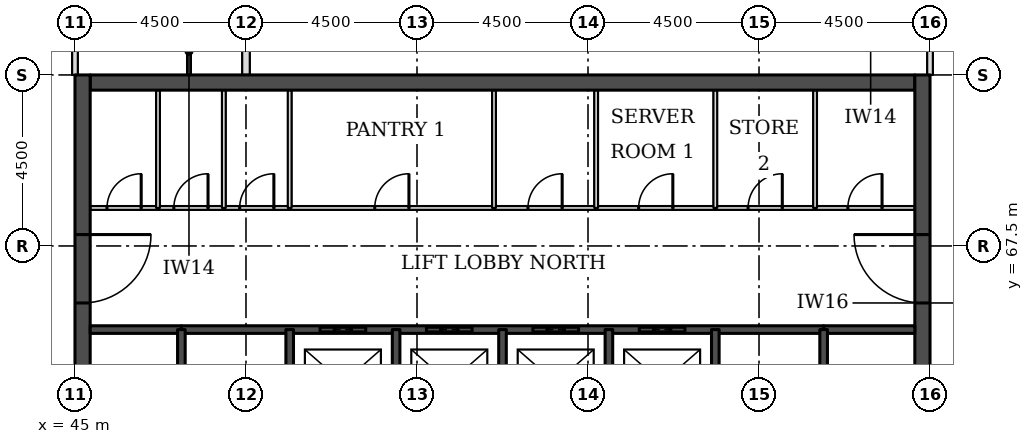
"""IFC4 building model, lengths in metres.
Left out: names, types, materials, properties, quantities, classifications, styles, units other than length and angle.
Written with IfcOpenShell. Run it as: python <this file> out.ifc"""

import sys

from ifc_helpers import new_model, si_unit, direction, frame, frame_2d, origin, place, context, subcontext, project, spatial, rectangle, extrude, element, fill, save


model = new_model("IFC4")
c1 = context("Model", 3, precision=1e-05, world=origin(), true_north=direction((0.0, 1.0)))
c2 = subcontext(c1, "Body", "Model", "MODEL_VIEW")
j1 = project(units=[si_unit("LENGTHUNIT", "METRE"), si_unit("PLANEANGLEUNIT", "RADIAN")], contexts=[c1])
p1 = place(None, origin())
s1 = spatial("IfcSite", under=j1, at=p1, CompositionType="ELEMENT")
p2 = place(p1, origin())
s2 = spatial("IfcBuilding", under=s1, at=p2, CompositionType="ELEMENT")
p3 = place(p2, frame((0.0, 0.0, 184.7)))
s3 = spatial("IfcBuildingStorey", under=s2, at=p3, CompositionType="ELEMENT", Elevation=184.7)
p4 = place(p3, frame((45.4, 71.8, 0.0), z_axis=(0.0, 0.0, 1.0), x_axis=(1.0, 0.0, 0.0)))
e1 = element("IfcWall", 1, at=p4, inside=s3, PredefinedType="SHEAR", context=c2, shape_type="SweptSolid", body=[
    extrude(rectangle(XDim=21.7, YDim=0.4, at=frame_2d((10.85, 0.0))), origin(), (0.0, 0.0, 1.0), 3.7),
])
p5 = place(p3, frame((45.2, 49.5, 0.0), z_axis=(0.0, 0.0, 1.0), x_axis=(0.0, 1.0, 0.0)))
e2 = element("IfcWall", 2, at=p5, inside=s3, PredefinedType="SHEAR", context=c2, shape_type="SweptSolid", body=[
    extrude(rectangle(XDim=22.5, YDim=0.4, at=frame_2d((11.25, 0.0))), origin(), (0.0, 0.0, 1.0), 3.7),
])
p6 = place(p5, frame((4.2, 0.0, 0.0)))
e3 = element("IfcOpeningElement", 3, at=p6, cuts=e2, PredefinedType="OPENING", context=c2, shape_type="SweptSolid", body=[
    extrude(rectangle(XDim=1.8, YDim=2.1, at=frame_2d((0.9, 1.05))), frame((0.0, 0.21, 0.0), z_axis=(0.0, -1.0, 0.0), x_axis=(1.0, 0.0, 0.0)), (0.0, 0.0, 1.0), 0.42),
])
p7 = place(p5, frame((6.9, 0.0, 0.0)))
e4 = element("IfcOpeningElement", 4, at=p7, cuts=e2, PredefinedType="OPENING", context=c2, shape_type="SweptSolid", body=[
    extrude(rectangle(XDim=1.1, YDim=2.1, at=frame_2d((0.55, 1.05))), frame((0.0, 0.21, 0.0), z_axis=(0.0, -1.0, 0.0), x_axis=(1.0, 0.0, 0.0)), (0.0, 0.0, 1.0), 0.42),
])
p8 = place(p5, frame((13.6, 0.0, 0.0)))
e5 = element("IfcOpeningElement", 5, at=p8, cuts=e2, PredefinedType="OPENING", context=c2, shape_type="SweptSolid", body=[
    extrude(rectangle(XDim=1.1, YDim=2.1, at=frame_2d((0.55, 1.05))), frame((0.0, 0.21, 0.0), z_axis=(0.0, -1.0, 0.0), x_axis=(1.0, 0.0, 0.0)), (0.0, 0.0, 1.0), 0.42),
])
p9 = place(p5, frame((16.5, 0.0, 0.0)))
e6 = element("IfcOpeningElement", 6, at=p9, cuts=e2, PredefinedType="OPENING", context=c2, shape_type="SweptSolid", body=[
    extrude(rectangle(XDim=1.8, YDim=2.1, at=frame_2d((0.9, 1.05))), frame((0.0, 0.21, 0.0), z_axis=(0.0, -1.0, 0.0), x_axis=(1.0, 0.0, 0.0)), (0.0, 0.0, 1.0), 0.42),
])
p10 = place(p3, frame((67.3, 49.5, 0.0), z_axis=(0.0, 0.0, 1.0), x_axis=(0.0, 1.0, 0.0)))
e7 = element("IfcWall", 7, at=p10, inside=s3, PredefinedType="SHEAR", context=c2, shape_type="SweptSolid", body=[
    extrude(rectangle(XDim=22.5, YDim=0.4, at=frame_2d((11.25, 0.0))), origin(), (0.0, 0.0, 1.0), 3.7),
])
p11 = place(p10, frame((4.2, 0.0, 0.0)))
e8 = element("IfcOpeningElement", 8, at=p11, cuts=e7, PredefinedType="OPENING", context=c2, shape_type="SweptSolid", body=[
    extrude(rectangle(XDim=1.8, YDim=2.1, at=frame_2d((0.9, 1.05))), frame((0.0, 0.21, 0.0), z_axis=(0.0, -1.0, 0.0), x_axis=(1.0, 0.0, 0.0)), (0.0, 0.0, 1.0), 0.42),
])
p12 = place(p10, frame((6.9, 0.0, 0.0)))
e9 = element("IfcOpeningElement", 9, at=p12, cuts=e7, PredefinedType="OPENING", context=c2, shape_type="SweptSolid", body=[
    extrude(rectangle(XDim=1.1, YDim=2.1, at=frame_2d((0.55, 1.05))), frame((0.0, 0.21, 0.0), z_axis=(0.0, -1.0, 0.0), x_axis=(1.0, 0.0, 0.0)), (0.0, 0.0, 1.0), 0.42),
])
p13 = place(p10, frame((13.6, 0.0, 0.0)))
e10 = element("IfcOpeningElement", 10, at=p13, cuts=e7, PredefinedType="OPENING", context=c2, shape_type="SweptSolid", body=[
    extrude(rectangle(XDim=1.1, YDim=2.1, at=frame_2d((0.55, 1.05))), frame((0.0, 0.21, 0.0), z_axis=(0.0, -1.0, 0.0), x_axis=(1.0, 0.0, 0.0)), (0.0, 0.0, 1.0), 0.42),
])
p14 = place(p10, frame((16.5, 0.0, 0.0)))
e11 = element("IfcOpeningElement", 11, at=p14, cuts=e7, PredefinedType="OPENING", context=c2, shape_type="SweptSolid", body=[
    extrude(rectangle(XDim=1.8, YDim=2.1, at=frame_2d((0.9, 1.05))), frame((0.0, 0.21, 0.0), z_axis=(0.0, -1.0, 0.0), x_axis=(1.0, 0.0, 0.0)), (0.0, 0.0, 1.0), 0.42),
])
p15 = place(p3, frame((45.0, 72.0, 0.0), z_axis=(0.0, 0.0, 1.0), x_axis=(0.0, 1.0, 0.0)))
e12 = element("IfcWall", 12, at=p15, inside=s3, PredefinedType="PARTITIONING", context=c2, shape_type="SweptSolid", body=[
    extrude(rectangle(XDim=4.5, YDim=0.15, at=frame_2d((2.25, 0.0))), origin(), (0.0, 0.0, 1.0), 3.022),
])
p16 = place(p15, frame((1.75, 0.0, 0.0)))
e13 = element("IfcOpeningElement", 13, at=p16, cuts=e12, PredefinedType="OPENING", context=c2, shape_type="SweptSolid", body=[
    extrude(rectangle(XDim=1.0, YDim=2.1, at=frame_2d((0.5, 1.05))), frame((0.0, 0.085, 0.0), z_axis=(0.0, -1.0, 0.0), x_axis=(1.0, 0.0, 0.0)), (0.0, 0.0, 1.0), 0.17),
])
p17 = place(p3, frame((48.0, 72.0, 0.0), z_axis=(0.0, 0.0, 1.0), x_axis=(0.0, 1.0, 0.0)))
e14 = element("IfcWall", 14, at=p17, inside=s3, PredefinedType="PARTITIONING", context=c2, shape_type="SweptSolid", body=[
    extrude(rectangle(XDim=4.45, YDim=0.1, at=frame_2d((2.225, 0.0))), origin(), (0.0, 0.0, 1.0), 3.55),
])
p18 = place(p3, frame((49.5, 72.0, 0.0), z_axis=(0.0, 0.0, 1.0), x_axis=(0.0, 1.0, 0.0)))
e15 = element("IfcWall", 15, at=p18, inside=s3, PredefinedType="PARTITIONING", context=c2, shape_type="SweptSolid", body=[
    extrude(rectangle(XDim=3.0, YDim=0.2, at=frame_2d((1.5, 0.0))), origin(), (0.0, 0.0, 1.0), 3.55),
])
p19 = place(p3, frame((67.5, 72.0, 0.0), z_axis=(0.0, 0.0, 1.0), x_axis=(0.0, 1.0, 0.0)))
e16 = element("IfcWall", 16, at=p19, inside=s3, PredefinedType="PARTITIONING", context=c2, shape_type="SweptSolid", body=[
    extrude(rectangle(XDim=3.0, YDim=0.15, at=frame_2d((1.5, 0.0))), origin(), (0.0, 0.0, 1.0), 3.022),
])
for number, where, z_axis, x_axis in (
    (17, (45.4, 65.3, 0.0), (0.0, 0.0, 1.0), (1.0, 0.0, 0.0)),
    (18, (64.7, 65.3, 0.0), (0.0, 0.0, 1.0), (1.0, 0.0, 0.0)),
):
    element("IfcWall", number, at=place(p3, frame(where, z_axis=z_axis, x_axis=x_axis)), inside=s3, PredefinedType="SOLIDWALL", context=c2, shape_type="SweptSolid", body=[
        extrude(rectangle(XDim=2.4, YDim=0.2, at=frame_2d((1.2, 0.0))), origin(), (0.0, 0.0, 1.0), 3.55),
    ])
p20 = place(p3, frame((47.8, 65.3, 0.0), z_axis=(0.0, 0.0, 1.0), x_axis=(1.0, 0.0, 0.0)))
e19 = element("IfcWall", 19, at=p20, inside=s3, PredefinedType="SOLIDWALL", context=c2, shape_type="SweptSolid", body=[
    extrude(rectangle(XDim=16.9, YDim=0.2, at=frame_2d((8.45, 0.0))), origin(), (0.0, 0.0, 1.0), 3.55),
])
p21 = place(p20, frame((3.65, 0.0, 0.0)))
e20 = element("IfcOpeningElement", 20, at=p21, cuts=e19, PredefinedType="OPENING", context=c2, shape_type="SweptSolid", body=[
    extrude(rectangle(XDim=1.2, YDim=2.1, at=frame_2d((0.6, 1.05))), frame((0.0, 0.11, 0.0), z_axis=(0.0, -1.0, 0.0), x_axis=(1.0, 0.0, 0.0)), (0.0, 0.0, 1.0), 0.22),
])
p22 = place(p20, frame((6.45, 0.0, 0.0)))
e21 = element("IfcOpeningElement", 21, at=p22, cuts=e19, PredefinedType="OPENING", context=c2, shape_type="SweptSolid", body=[
    extrude(rectangle(XDim=1.2, YDim=2.1, at=frame_2d((0.6, 1.05))), frame((0.0, 0.11, 0.0), z_axis=(0.0, -1.0, 0.0), x_axis=(1.0, 0.0, 0.0)), (0.0, 0.0, 1.0), 0.22),
])
p23 = place(p20, frame((9.25, 0.0, 0.0)))
e22 = element("IfcOpeningElement", 22, at=p23, cuts=e19, PredefinedType="OPENING", context=c2, shape_type="SweptSolid", body=[
    extrude(rectangle(XDim=1.2, YDim=2.1, at=frame_2d((0.6, 1.05))), frame((0.0, 0.11, 0.0), z_axis=(0.0, -1.0, 0.0), x_axis=(1.0, 0.0, 0.0)), (0.0, 0.0, 1.0), 0.22),
])
p24 = place(p20, frame((12.05, 0.0, 0.0)))
e23 = element("IfcOpeningElement", 23, at=p24, cuts=e19, PredefinedType="OPENING", context=c2, shape_type="SweptSolid", body=[
    extrude(rectangle(XDim=1.2, YDim=2.1, at=frame_2d((0.6, 1.05))), frame((0.0, 0.11, 0.0), z_axis=(0.0, -1.0, 0.0), x_axis=(1.0, 0.0, 0.0)), (0.0, 0.0, 1.0), 0.22),
])
p25 = place(p3, frame((45.4, 68.5, 0.0), z_axis=(0.0, 0.0, 1.0), x_axis=(1.0, 0.0, 0.0)))
e24 = element("IfcWall", 24, at=p25, inside=s3, PredefinedType="PARTITIONING", context=c2, shape_type="SweptSolid", body=[
    extrude(rectangle(XDim=21.7, YDim=0.1, at=frame_2d((10.85, 0.0))), origin(), (0.0, 0.0, 1.0), 3.55),
])
p26 = place(p25, frame((19.938, 0.0, 0.0)))
e25 = element("IfcOpeningElement", 25, at=p26, cuts=e24, PredefinedType="OPENING", context=c2, shape_type="SweptSolid", body=[
    extrude(rectangle(XDim=0.9, YDim=2.1, at=frame_2d((0.45, 1.05))), frame((0.0, 0.06, 0.0), z_axis=(0.0, -1.0, 0.0), x_axis=(1.0, 0.0, 0.0)), (0.0, 0.0, 1.0), 0.12),
])
p27 = place(p25, frame((17.312, 0.0, 0.0)))
e26 = element("IfcOpeningElement", 26, at=p27, cuts=e24, PredefinedType="OPENING", context=c2, shape_type="SweptSolid", body=[
    extrude(rectangle(XDim=0.9, YDim=2.1, at=frame_2d((0.45, 1.05))), frame((0.0, 0.06, 0.0), z_axis=(0.0, -1.0, 0.0), x_axis=(1.0, 0.0, 0.0)), (0.0, 0.0, 1.0), 0.12),
])
p28 = place(p25, frame((0.442, 0.0, 0.0)))
e27 = element("IfcOpeningElement", 27, at=p28, cuts=e24, PredefinedType="OPENING", context=c2, shape_type="SweptSolid", body=[
    extrude(rectangle(XDim=0.9, YDim=2.1, at=frame_2d((0.45, 1.05))), frame((0.0, 0.06, 0.0), z_axis=(0.0, -1.0, 0.0), x_axis=(1.0, 0.0, 0.0)), (0.0, 0.0, 1.0), 0.12),
])
p29 = place(p25, frame((2.201, 0.0, 0.0)))
e28 = element("IfcOpeningElement", 28, at=p29, cuts=e24, PredefinedType="OPENING", context=c2, shape_type="SweptSolid", body=[
    extrude(rectangle(XDim=0.9, YDim=2.1, at=frame_2d((0.45, 1.05))), frame((0.0, 0.06, 0.0), z_axis=(0.0, -1.0, 0.0), x_axis=(1.0, 0.0, 0.0)), (0.0, 0.0, 1.0), 0.12),
])
p30 = place(p25, frame((3.934, 0.0, 0.0)))
e29 = element("IfcOpeningElement", 29, at=p30, cuts=e24, PredefinedType="OPENING", context=c2, shape_type="SweptSolid", body=[
    extrude(rectangle(XDim=0.9, YDim=2.1, at=frame_2d((0.45, 1.05))), frame((0.0, 0.06, 0.0), z_axis=(0.0, -1.0, 0.0), x_axis=(1.0, 0.0, 0.0)), (0.0, 0.0, 1.0), 0.12),
])
p31 = place(p25, frame((14.432, 0.0, 0.0)))
e30 = element("IfcOpeningElement", 30, at=p31, cuts=e24, PredefinedType="OPENING", context=c2, shape_type="SweptSolid", body=[
    extrude(rectangle(XDim=0.9, YDim=2.1, at=frame_2d((0.45, 1.05))), frame((0.0, 0.06, 0.0), z_axis=(0.0, -1.0, 0.0), x_axis=(1.0, 0.0, 0.0)), (0.0, 0.0, 1.0), 0.12),
])
p32 = place(p25, frame((11.52, 0.0, 0.0)))
e31 = element("IfcOpeningElement", 31, at=p32, cuts=e24, PredefinedType="OPENING", context=c2, shape_type="SweptSolid", body=[
    extrude(rectangle(XDim=0.9, YDim=2.1, at=frame_2d((0.45, 1.05))), frame((0.0, 0.06, 0.0), z_axis=(0.0, -1.0, 0.0), x_axis=(1.0, 0.0, 0.0)), (0.0, 0.0, 1.0), 0.12),
])
p33 = place(p25, frame((7.488, 0.0, 0.0)))
e32 = element("IfcOpeningElement", 32, at=p33, cuts=e24, PredefinedType="OPENING", context=c2, shape_type="SweptSolid", body=[
    extrude(rectangle(XDim=0.9, YDim=2.1, at=frame_2d((0.45, 1.05))), frame((0.0, 0.06, 0.0), z_axis=(0.0, -1.0, 0.0), x_axis=(1.0, 0.0, 0.0)), (0.0, 0.0, 1.0), 0.12),
])
p34 = place(p3, frame((47.185, 68.5, 0.0), z_axis=(0.0, 0.0, 1.0), x_axis=(0.0, 1.0, 0.0)))
e33 = element("IfcWall", 33, at=p34, inside=s3, PredefinedType="PARTITIONING", context=c2, shape_type="SweptSolid", body=[
    extrude(rectangle(XDim=3.1, YDim=0.1, at=frame_2d((1.55, 0.0))), origin(), (0.0, 0.0, 1.0), 3.55),
])
p35 = place(p3, frame((47.8, 62.0, 0.0), z_axis=(0.0, 0.0, 1.0), x_axis=(0.0, 1.0, 0.0)))
e34 = element("IfcWall", 34, at=p35, inside=s3, PredefinedType="SOLIDWALL", context=c2, shape_type="SweptSolid", body=[
    extrude(rectangle(XDim=3.3, YDim=0.2, at=frame_2d((1.65, 0.0))), origin(), (0.0, 0.0, 1.0), 3.55),
])
p36 = place(p35, frame((1.1, 0.0, 0.0)))
e35 = element("IfcOpeningElement", 35, at=p36, cuts=e34, PredefinedType="OPENING", context=c2, shape_type="SweptSolid", body=[
    extrude(rectangle(XDim=1.1, YDim=2.1, at=frame_2d((0.55, 1.05))), frame((0.0, 0.11, 0.0), z_axis=(0.0, -1.0, 0.0), x_axis=(1.0, 0.0, 0.0)), (0.0, 0.0, 1.0), 0.22),
])
for number, where, z_axis, x_axis in (
    (36, (48.917, 68.5, 0.0), (0.0, 0.0, 1.0), (0.0, 1.0, 0.0)),
    (37, (50.65, 68.5, 0.0), (0.0, 0.0, 1.0), (0.0, 1.0, 0.0)),
):
    element("IfcWall", number, at=place(p3, frame(where, z_axis=z_axis, x_axis=x_axis)), inside=s3, PredefinedType="PARTITIONING", context=c2, shape_type="SweptSolid", body=[
        extrude(rectangle(XDim=3.1, YDim=0.1, at=frame_2d((1.55, 0.0))), origin(), (0.0, 0.0, 1.0), 3.55),
    ])
p37 = place(p3, frame((50.65, 62.0, 0.0), z_axis=(0.0, 0.0, 1.0), x_axis=(0.0, 1.0, 0.0)))
e38 = element("IfcWall", 38, at=p37, inside=s3, PredefinedType="SOLIDWALL", context=c2, shape_type="SweptSolid", body=[
    extrude(rectangle(XDim=3.3, YDim=0.2, at=frame_2d((1.65, 0.0))), origin(), (0.0, 0.0, 1.0), 3.55),
])
p38 = place(p3, frame((53.45, 62.5, 0.0), z_axis=(0.0, 0.0, 1.0), x_axis=(0.0, 1.0, 0.0)))
e39 = element("IfcWall", 39, at=p38, inside=s3, PredefinedType="SOLIDWALL", context=c2, shape_type="SweptSolid", body=[
    extrude(rectangle(XDim=2.8, YDim=0.2, at=frame_2d((1.4, 0.0))), origin(), (0.0, 0.0, 1.0), 3.55),
])
p39 = place(p3, frame((56.026, 68.5, 0.0), z_axis=(0.0, 0.0, 1.0), x_axis=(0.0, 1.0, 0.0)))
e40 = element("IfcWall", 40, at=p39, inside=s3, PredefinedType="PARTITIONING", context=c2, shape_type="SweptSolid", body=[
    extrude(rectangle(XDim=3.1, YDim=0.1, at=frame_2d((1.55, 0.0))), origin(), (0.0, 0.0, 1.0), 3.55),
])
p40 = place(p3, frame((56.25, 62.5, 0.0), z_axis=(0.0, 0.0, 1.0), x_axis=(0.0, 1.0, 0.0)))
e41 = element("IfcWall", 41, at=p40, inside=s3, PredefinedType="SOLIDWALL", context=c2, shape_type="SweptSolid", body=[
    extrude(rectangle(XDim=2.8, YDim=0.2, at=frame_2d((1.4, 0.0))), origin(), (0.0, 0.0, 1.0), 3.55),
])
p41 = place(p3, frame((58.714, 68.5, 0.0), z_axis=(0.0, 0.0, 1.0), x_axis=(0.0, 1.0, 0.0)))
e42 = element("IfcWall", 42, at=p41, inside=s3, PredefinedType="PARTITIONING", context=c2, shape_type="SweptSolid", body=[
    extrude(rectangle(XDim=3.1, YDim=0.1, at=frame_2d((1.55, 0.0))), origin(), (0.0, 0.0, 1.0), 3.55),
])
p42 = place(p3, frame((59.05, 62.5, 0.0), z_axis=(0.0, 0.0, 1.0), x_axis=(0.0, 1.0, 0.0)))
e43 = element("IfcWall", 43, at=p42, inside=s3, PredefinedType="SOLIDWALL", context=c2, shape_type="SweptSolid", body=[
    extrude(rectangle(XDim=2.8, YDim=0.2, at=frame_2d((1.4, 0.0))), origin(), (0.0, 0.0, 1.0), 3.55),
])
p43 = place(p3, frame((61.85, 68.5, 0.0), z_axis=(0.0, 0.0, 1.0), x_axis=(0.0, 1.0, 0.0)))
e44 = element("IfcWall", 44, at=p43, inside=s3, PredefinedType="PARTITIONING", context=c2, shape_type="SweptSolid", body=[
    extrude(rectangle(XDim=3.1, YDim=0.1, at=frame_2d((1.55, 0.0))), origin(), (0.0, 0.0, 1.0), 3.55),
])
p44 = place(p3, frame((61.85, 62.0, 0.0), z_axis=(0.0, 0.0, 1.0), x_axis=(0.0, 1.0, 0.0)))
e45 = element("IfcWall", 45, at=p44, inside=s3, PredefinedType="SOLIDWALL", context=c2, shape_type="SweptSolid", body=[
    extrude(rectangle(XDim=3.3, YDim=0.2, at=frame_2d((1.65, 0.0))), origin(), (0.0, 0.0, 1.0), 3.55),
])
p45 = place(p3, frame((64.475, 68.5, 0.0), z_axis=(0.0, 0.0, 1.0), x_axis=(0.0, 1.0, 0.0)))
e46 = element("IfcWall", 46, at=p45, inside=s3, PredefinedType="PARTITIONING", context=c2, shape_type="SweptSolid", body=[
    extrude(rectangle(XDim=3.1, YDim=0.1, at=frame_2d((1.55, 0.0))), origin(), (0.0, 0.0, 1.0), 3.55),
])
p46 = place(p3, frame((64.7, 62.0, 0.0), z_axis=(0.0, 0.0, 1.0), x_axis=(0.0, 1.0, 0.0)))
e47 = element("IfcWall", 47, at=p46, inside=s3, PredefinedType="SOLIDWALL", context=c2, shape_type="SweptSolid", body=[
    extrude(rectangle(XDim=3.3, YDim=0.2, at=frame_2d((1.65, 0.0))), origin(), (0.0, 0.0, 1.0), 3.55),
])
p47 = place(p46, frame((1.1, 0.0, 0.0)))
e48 = element("IfcOpeningElement", 48, at=p47, cuts=e47, PredefinedType="OPENING", context=c2, shape_type="SweptSolid", body=[
    extrude(rectangle(XDim=1.1, YDim=2.1, at=frame_2d((0.55, 1.05))), frame((0.0, 0.11, 0.0), z_axis=(0.0, -1.0, 0.0), x_axis=(1.0, 0.0, 0.0)), (0.0, 0.0, 1.0), 0.22),
])
p48 = place(p21, origin())
e49 = element("IfcDoor", 49, at=p48, inside=s3, OperationType="DOUBLE_DOOR_SLIDING", PredefinedType="DOOR", context=c2, shape_type="SweptSolid", body=[
    extrude(rectangle(XDim=1.2, YDim=2.1, at=frame_2d((0.6, 1.05))), frame((0.0, 0.025, 0.0), z_axis=(0.0, -1.0, 0.0), x_axis=(1.0, 0.0, 0.0)), (0.0, 0.0, 1.0), 0.05),
])
fill(e20, e49)
p49 = place(p22, origin())
e50 = element("IfcDoor", 50, at=p49, inside=s3, OperationType="DOUBLE_DOOR_SLIDING", PredefinedType="DOOR", context=c2, shape_type="SweptSolid", body=[
    extrude(rectangle(XDim=1.2, YDim=2.1, at=frame_2d((0.6, 1.05))), frame((0.0, 0.025, 0.0), z_axis=(0.0, -1.0, 0.0), x_axis=(1.0, 0.0, 0.0)), (0.0, 0.0, 1.0), 0.05),
])
fill(e21, e50)
p50 = place(p23, origin())
e51 = element("IfcDoor", 51, at=p50, inside=s3, OperationType="DOUBLE_DOOR_SLIDING", PredefinedType="DOOR", context=c2, shape_type="SweptSolid", body=[
    extrude(rectangle(XDim=1.2, YDim=2.1, at=frame_2d((0.6, 1.05))), frame((0.0, 0.025, 0.0), z_axis=(0.0, -1.0, 0.0), x_axis=(1.0, 0.0, 0.0)), (0.0, 0.0, 1.0), 0.05),
])
fill(e22, e51)
p51 = place(p24, origin())
e52 = element("IfcDoor", 52, at=p51, inside=s3, OperationType="DOUBLE_DOOR_SLIDING", PredefinedType="DOOR", context=c2, shape_type="SweptSolid", body=[
    extrude(rectangle(XDim=1.2, YDim=2.1, at=frame_2d((0.6, 1.05))), frame((0.0, 0.025, 0.0), z_axis=(0.0, -1.0, 0.0), x_axis=(1.0, 0.0, 0.0)), (0.0, 0.0, 1.0), 0.05),
])
fill(e23, e52)
p52 = place(p9, frame((1.8, 0.0, 0.0), z_axis=(0.0, 0.0, 1.0), x_axis=(-1.0, 0.0, 0.0)))
e53 = element("IfcDoor", 53, at=p52, inside=s3, OperationType="SINGLE_SWING_LEFT", PredefinedType="DOOR", context=c2, shape_type="SweptSolid", body=[
    extrude(rectangle(XDim=1.8, YDim=2.1, at=frame_2d((0.9, 1.05))), frame((0.0, 0.025, 0.0), z_axis=(0.0, -1.0, 0.0), x_axis=(1.0, 0.0, 0.0)), (0.0, 0.0, 1.0), 0.05),
])
fill(e6, e53)
p53 = place(p14, origin())
e54 = element("IfcDoor", 54, at=p53, inside=s3, OperationType="SINGLE_SWING_RIGHT", PredefinedType="DOOR", context=c2, shape_type="SweptSolid", body=[
    extrude(rectangle(XDim=1.8, YDim=2.1, at=frame_2d((0.9, 1.05))), frame((0.0, 0.025, 0.0), z_axis=(0.0, -1.0, 0.0), x_axis=(1.0, 0.0, 0.0)), (0.0, 0.0, 1.0), 0.05),
])
fill(e11, e54)
p54 = place(p26, origin())
e55 = element("IfcDoor", 55, at=p54, inside=s3, OperationType="SINGLE_SWING_RIGHT", PredefinedType="DOOR", context=c2, shape_type="SweptSolid", body=[
    extrude(rectangle(XDim=0.9, YDim=2.1, at=frame_2d((0.45, 1.05))), frame((0.0, 0.025, 0.0), z_axis=(0.0, -1.0, 0.0), x_axis=(1.0, 0.0, 0.0)), (0.0, 0.0, 1.0), 0.05),
])
fill(e25, e55)
p55 = place(p27, origin())
e56 = element("IfcDoor", 56, at=p55, inside=s3, OperationType="SINGLE_SWING_RIGHT", PredefinedType="DOOR", context=c2, shape_type="SweptSolid", body=[
    extrude(rectangle(XDim=0.9, YDim=2.1, at=frame_2d((0.45, 1.05))), frame((0.0, 0.025, 0.0), z_axis=(0.0, -1.0, 0.0), x_axis=(1.0, 0.0, 0.0)), (0.0, 0.0, 1.0), 0.05),
])
fill(e26, e56)
p56 = place(p28, origin())
e57 = element("IfcDoor", 57, at=p56, inside=s3, OperationType="SINGLE_SWING_RIGHT", PredefinedType="DOOR", context=c2, shape_type="SweptSolid", body=[
    extrude(rectangle(XDim=0.9, YDim=2.1, at=frame_2d((0.45, 1.05))), frame((0.0, 0.025, 0.0), z_axis=(0.0, -1.0, 0.0), x_axis=(1.0, 0.0, 0.0)), (0.0, 0.0, 1.0), 0.05),
])
fill(e27, e57)
p57 = place(p29, origin())
e58 = element("IfcDoor", 58, at=p57, inside=s3, OperationType="SINGLE_SWING_RIGHT", PredefinedType="DOOR", context=c2, shape_type="SweptSolid", body=[
    extrude(rectangle(XDim=0.9, YDim=2.1, at=frame_2d((0.45, 1.05))), frame((0.0, 0.025, 0.0), z_axis=(0.0, -1.0, 0.0), x_axis=(1.0, 0.0, 0.0)), (0.0, 0.0, 1.0), 0.05),
])
fill(e28, e58)
p58 = place(p30, origin())
e59 = element("IfcDoor", 59, at=p58, inside=s3, OperationType="SINGLE_SWING_RIGHT", PredefinedType="DOOR", context=c2, shape_type="SweptSolid", body=[
    extrude(rectangle(XDim=0.9, YDim=2.1, at=frame_2d((0.45, 1.05))), frame((0.0, 0.025, 0.0), z_axis=(0.0, -1.0, 0.0), x_axis=(1.0, 0.0, 0.0)), (0.0, 0.0, 1.0), 0.05),
])
fill(e29, e59)
p59 = place(p31, origin())
e60 = element("IfcDoor", 60, at=p59, inside=s3, OperationType="SINGLE_SWING_RIGHT", PredefinedType="DOOR", context=c2, shape_type="SweptSolid", body=[
    extrude(rectangle(XDim=0.9, YDim=2.1, at=frame_2d((0.45, 1.05))), frame((0.0, 0.025, 0.0), z_axis=(0.0, -1.0, 0.0), x_axis=(1.0, 0.0, 0.0)), (0.0, 0.0, 1.0), 0.05),
])
fill(e30, e60)
p60 = place(p32, origin())
e61 = element("IfcDoor", 61, at=p60, inside=s3, OperationType="SINGLE_SWING_RIGHT", PredefinedType="DOOR", context=c2, shape_type="SweptSolid", body=[
    extrude(rectangle(XDim=0.9, YDim=2.1, at=frame_2d((0.45, 1.05))), frame((0.0, 0.025, 0.0), z_axis=(0.0, -1.0, 0.0), x_axis=(1.0, 0.0, 0.0)), (0.0, 0.0, 1.0), 0.05),
])
fill(e31, e61)
p61 = place(p33, origin())
e62 = element("IfcDoor", 62, at=p61, inside=s3, OperationType="SINGLE_SWING_RIGHT", PredefinedType="DOOR", context=c2, shape_type="SweptSolid", body=[
    extrude(rectangle(XDim=0.9, YDim=2.1, at=frame_2d((0.45, 1.05))), frame((0.0, 0.025, 0.0), z_axis=(0.0, -1.0, 0.0), x_axis=(1.0, 0.0, 0.0)), (0.0, 0.0, 1.0), 0.05),
])
fill(e32, e62)
save(model, sys.argv[1])
